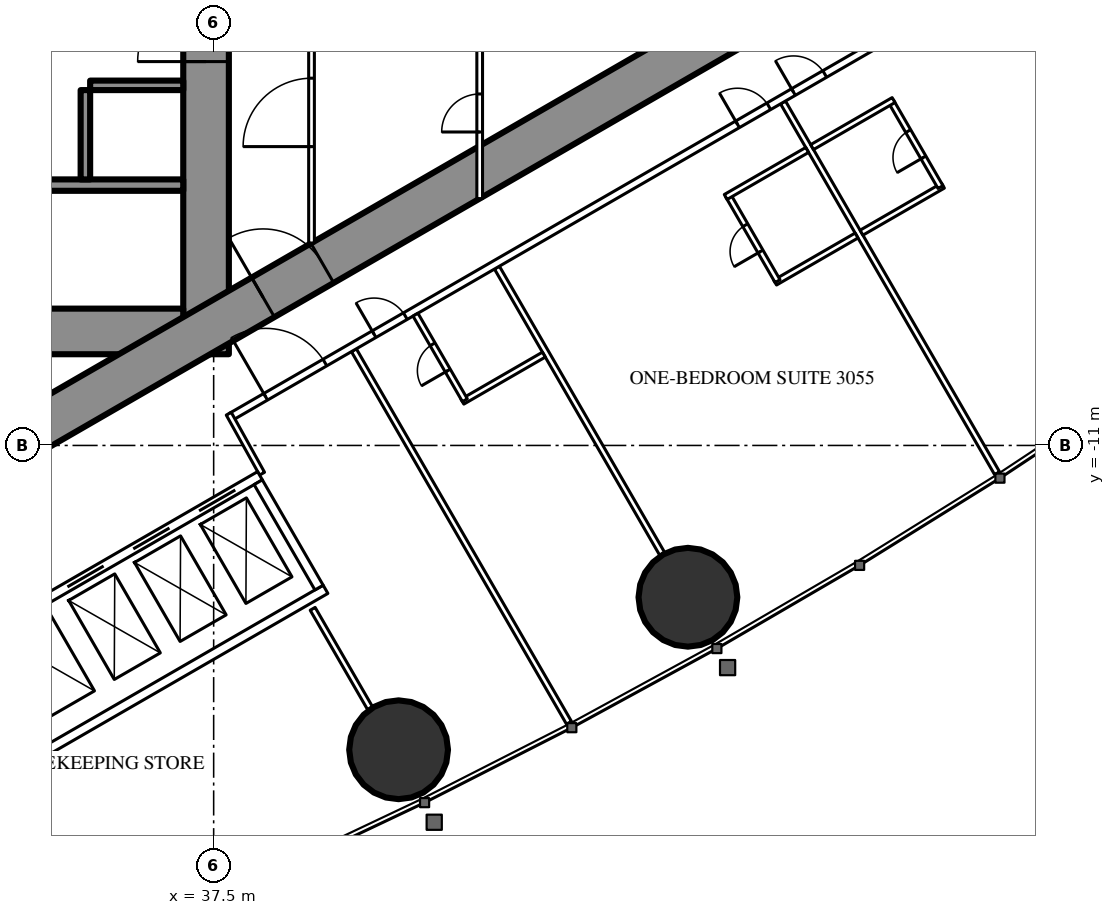
"""IFC4 building model, lengths in metres.
Left out: names, types, materials, properties, quantities, classifications, styles, units other than length and angle.
Written with IfcOpenShell. Run it as: python <this file> out.ifc"""

import sys

from ifc_helpers import new_model, si_unit, direction, frame, frame_2d, origin, origin_2d, place, context, subcontext, project, spatial, rectangle, hollow_circle, extrude, element, fill, save


model = new_model("IFC4")
c1 = context("Model", 3, precision=1e-05, world=origin(), true_north=direction((0.0, 1.0)))
c2 = subcontext(c1, "Body", "Model", "MODEL_VIEW")
j1 = project(units=[si_unit("LENGTHUNIT", "METRE"), si_unit("PLANEANGLEUNIT", "RADIAN")], contexts=[c1])
p1 = place(None, origin())
s1 = spatial("IfcSite", under=j1, at=p1, CompositionType="ELEMENT")
p2 = place(p1, origin())
s2 = spatial("IfcBuilding", under=s1, at=p2, CompositionType="ELEMENT")
p3 = place(p2, frame((0.0, 0.0, 115.1)))
s3 = spatial("IfcBuildingStorey", under=s2, at=p3, CompositionType="ELEMENT", Elevation=115.1)
for number, where, z_axis, x_axis in (
    (1, (42.366, -19.007, 0.0), (0.0, 0.0, 1.0), (1.0, 0.0, 0.0)),
    (2, (49.979, -14.994, 0.0), (0.0, 0.0, 1.0), (1.0, 0.0, 0.0)),
):
    element("IfcColumn", number, at=place(p3, frame(where, z_axis=z_axis, x_axis=x_axis)), inside=s3, PredefinedType="COLUMN", context=c2, shape_type="SweptSolid", body=[
        extrude(hollow_circle(Radius=1.3, WallThickness=0.1, at=origin_2d()), origin(), (0.0, 0.0, 1.0), 3.5),
    ])
p4 = place(p3, frame((37.3, -8.6, 0.0), z_axis=(0.0, 0.0, 1.0), x_axis=(0.0, 1.0, 0.0)))
e3 = element("IfcWall", 3, at=p4, inside=s3, PredefinedType="SHEAR", context=c2, shape_type="SweptSolid", body=[
    extrude(rectangle(XDim=17.2, YDim=1.2, at=frame_2d((8.6, 0.0))), origin(), (0.0, 0.0, 1.0), 3.5),
])
p5 = place(p4, frame((7.7, 0.0, 0.0)))
e4 = element("IfcOpeningElement", 4, at=p5, cuts=e3, PredefinedType="OPENING", context=c2, shape_type="SweptSolid", body=[
    extrude(rectangle(XDim=1.8, YDim=2.2, at=frame_2d((0.9, 1.1))), frame((0.0, 0.61, 0.0), z_axis=(0.0, -1.0, 0.0), x_axis=(1.0, 0.0, 0.0)), (0.0, 0.0, 1.0), 1.22),
])
p6 = place(p3, frame((28.3, -8.0, 0.0), z_axis=(0.0, 0.0, 1.0), x_axis=(1.0, 0.0, 0.0)))
e5 = element("IfcWall", 5, at=p6, inside=s3, PredefinedType="SHEAR", context=c2, shape_type="SweptSolid", body=[
    extrude(rectangle(XDim=8.4, YDim=1.2, at=frame_2d((4.2, 0.0))), origin(), (0.0, 0.0, 1.0), 3.5),
])
p7 = place(p6, frame((0.25, 0.0, 0.0)))
e6 = element("IfcOpeningElement", 6, at=p7, cuts=e5, PredefinedType="OPENING", context=c2, shape_type="SweptSolid", body=[
    extrude(rectangle(XDim=1.0, YDim=2.2, at=frame_2d((0.5, 1.1))), frame((0.0, 0.61, 0.0), z_axis=(0.0, -1.0, 0.0), x_axis=(1.0, 0.0, 0.0)), (0.0, 0.0, 1.0), 1.22),
])
p8 = place(p3, frame((28.3, -4.15, 0.0), z_axis=(0.0, 0.0, 1.0), x_axis=(1.0, 0.0, 0.0)))
e7 = element("IfcWall", 7, at=p8, inside=s3, PredefinedType="SHEAR", context=c2, shape_type="SweptSolid", body=[
    extrude(rectangle(XDim=8.4, YDim=0.3, at=frame_2d((4.2, 0.0))), origin(), (0.0, 0.0, 1.0), 3.5),
])
p9 = place(p3, frame((34.125, -4.0, 0.0), z_axis=(0.0, 0.0, 1.0), x_axis=(0.0, 1.0, 0.0)))
e8 = element("IfcWall", 8, at=p9, inside=s3, PredefinedType="SHEAR", context=c2, shape_type="SweptSolid", body=[
    extrude(rectangle(XDim=2.35, YDim=0.25, at=frame_2d((1.175, 0.0))), origin(), (0.0, 0.0, 1.0), 3.5),
])
p10 = place(p3, frame((34.25, -1.525, 0.0), z_axis=(0.0, 0.0, 1.0), x_axis=(1.0, 0.0, 0.0)))
e9 = element("IfcWall", 9, at=p10, inside=s3, PredefinedType="SHEAR", context=c2, shape_type="SweptSolid", body=[
    extrude(rectangle(XDim=2.45, YDim=0.25, at=frame_2d((1.225, 0.0))), origin(), (0.0, 0.0, 1.0), 3.5),
])
p11 = place(p3, frame((27.2, -13.8, 0.0), z_axis=(0.0, 0.0, 1.0), x_axis=(0.866027159892, 0.499996958321, 0.0)))
e10 = element("IfcWall", 10, at=p11, inside=s3, PredefinedType="SHEAR", context=c2, shape_type="SweptSolid", body=[
    extrude(rectangle(XDim=27.947, YDim=1.2, at=frame_2d((13.973, 0.0))), origin(), (0.0, 0.0, 1.0), 3.5),
])
p12 = place(p11, frame((4.6, 0.0, 0.0)))
e11 = element("IfcOpeningElement", 11, at=p12, cuts=e10, PredefinedType="OPENING", context=c2, shape_type="SweptSolid", body=[
    extrude(rectangle(XDim=1.0, YDim=2.2, at=frame_2d((0.5, 1.1))), frame((0.0, 0.61, 0.0), z_axis=(0.0, -1.0, 0.0), x_axis=(1.0, 0.0, 0.0)), (0.0, 0.0, 1.0), 1.22),
])
p13 = place(p11, frame((13.395, 0.0, 0.0)))
e12 = element("IfcOpeningElement", 12, at=p13, cuts=e10, PredefinedType="OPENING", context=c2, shape_type="SweptSolid", body=[
    extrude(rectangle(XDim=1.8, YDim=2.2, at=frame_2d((0.9, 1.1))), frame((0.0, 0.61, 0.0), z_axis=(0.0, -1.0, 0.0), x_axis=(1.0, 0.0, 0.0)), (0.0, 0.0, 1.0), 1.22),
])
p14 = place(p3, frame((41.19, -8.494, 0.0), z_axis=(0.0, 0.0, 1.0), x_axis=(0.49999258054, -0.866029687369, 0.0)))
e13 = element("IfcWall", 13, at=p14, inside=s3, PredefinedType="PARTITIONING", context=c2, shape_type="SweptSolid", body=[
    extrude(rectangle(XDim=11.318, YDim=0.15, at=frame_2d((5.659, 0.0))), origin(), (0.0, 0.0, 1.0), 3.25),
])
p15 = place(p3, frame((44.954, -6.321, 0.0), z_axis=(0.0, 0.0, 1.0), x_axis=(0.500018676722, -0.866014620505, 0.0)))
e14 = element("IfcWall", 14, at=p15, inside=s3, PredefinedType="PARTITIONING", context=c2, shape_type="SweptSolid", body=[
    extrude(rectangle(XDim=8.704, YDim=0.15, at=frame_2d((4.352, 0.0))), origin(), (0.0, 0.0, 1.0), 2.2),
])
p16 = place(p3, frame((52.481, -1.975, 0.0), z_axis=(0.0, 0.0, 1.0), x_axis=(0.500003867771, -0.866023170714, 0.0)))
e15 = element("IfcWall", 15, at=p16, inside=s3, PredefinedType="PARTITIONING", context=c2, shape_type="SweptSolid", body=[
    extrude(rectangle(XDim=11.265, YDim=0.15, at=frame_2d((5.632, 0.0))), origin(), (0.0, 0.0, 1.0), 3.25),
])
p17 = place(p3, frame((40.105, -15.299, 0.0), z_axis=(0.0, 0.0, 1.0), x_axis=(0.499978822259, -0.866037630414, 0.0)))
e16 = element("IfcWall", 16, at=p17, inside=s3, PredefinedType="PARTITIONING", context=c2, shape_type="SweptSolid", body=[
    extrude(rectangle(XDim=3.023, YDim=0.15, at=frame_2d((1.511, 0.0))), origin(), (0.0, 0.0, 1.0), 3.25),
])
p18 = place(p3, frame((37.96, -10.243, 0.0), z_axis=(0.0, 0.0, 1.0), x_axis=(0.866026429433, 0.499998223521, 0.0)))
e17 = element("IfcWall", 17, at=p18, inside=s3, PredefinedType="PARTITIONING", context=c2, shape_type="SweptSolid", body=[
    extrude(rectangle(XDim=20.487, YDim=0.2, at=frame_2d((10.243, 0.0))), origin(), (0.0, 0.0, 1.0), 3.25),
])
p19 = place(p18, frame((4.343, 0.0, 0.0)))
e18 = element("IfcOpeningElement", 18, at=p19, cuts=e17, PredefinedType="OPENING", context=c2, shape_type="SweptSolid", body=[
    extrude(rectangle(XDim=0.95, YDim=2.2, at=frame_2d((0.475, 1.1))), frame((0.0, 0.11, 0.0), z_axis=(0.0, -1.0, 0.0), x_axis=(1.0, 0.0, 0.0)), (0.0, 0.0, 1.0), 0.22),
])
p20 = place(p18, frame((15.385, 0.0, 0.0)))
e19 = element("IfcOpeningElement", 19, at=p20, cuts=e17, PredefinedType="OPENING", context=c2, shape_type="SweptSolid", body=[
    extrude(rectangle(XDim=0.95, YDim=2.2, at=frame_2d((0.475, 1.1))), frame((0.0, 0.11, 0.0), z_axis=(0.0, -1.0, 0.0), x_axis=(1.0, 0.0, 0.0)), (0.0, 0.0, 1.0), 0.22),
])
p21 = place(p18, frame((17.085, 0.0, 0.0)))
e20 = element("IfcOpeningElement", 20, at=p21, cuts=e17, PredefinedType="OPENING", context=c2, shape_type="SweptSolid", body=[
    extrude(rectangle(XDim=0.95, YDim=2.2, at=frame_2d((0.475, 1.1))), frame((0.0, 0.11, 0.0), z_axis=(0.0, -1.0, 0.0), x_axis=(1.0, 0.0, 0.0)), (0.0, 0.0, 1.0), 0.22),
])
p22 = place(p18, frame((1.048, 0.0, 0.0)))
e21 = element("IfcOpeningElement", 21, at=p22, cuts=e17, PredefinedType="OPENING", context=c2, shape_type="SweptSolid", body=[
    extrude(rectangle(XDim=1.8, YDim=2.2, at=frame_2d((0.9, 1.1))), frame((0.0, 0.11, 0.0), z_axis=(0.0, -1.0, 0.0), x_axis=(1.0, 0.0, 0.0)), (0.0, 0.0, 1.0), 0.22),
])
p23 = place(p3, frame((38.773, -11.742, 0.0), z_axis=(0.0, 0.0, 1.0), x_axis=(-0.485528096672, 0.8742210632, 0.0)))
e22 = element("IfcWall", 22, at=p23, inside=s3, PredefinedType="PARTITIONING", context=c2, shape_type="SweptSolid", body=[
    extrude(rectangle(XDim=1.805, YDim=0.15, at=frame_2d((0.903, 0.0))), origin(), (0.0, 0.0, 1.0), 3.25),
])
p24 = place(p3, frame((44.045, -9.848, 0.0), z_axis=(0.0, 0.0, 1.0), x_axis=(0.866031185235, 0.4999899861, 0.0)))
e23 = element("IfcWall", 23, at=p24, inside=s3, PredefinedType="PARTITIONING", context=c2, shape_type="SweptSolid", body=[
    extrude(rectangle(XDim=2.475, YDim=0.15, at=frame_2d((1.238, 0.0))), origin(), (0.0, 0.0, 1.0), 3.25),
])
p25 = place(p3, frame((42.81, -7.559, 0.0), z_axis=(0.0, 0.0, 1.0), x_axis=(0.499936506574, -0.866062058628, 0.0)))
e24 = element("IfcWall", 24, at=p25, inside=s3, PredefinedType="PARTITIONING", context=c2, shape_type="SweptSolid", body=[
    extrude(rectangle(XDim=2.6, YDim=0.15, at=frame_2d((1.3, 0.0))), origin(), (0.0, 0.0, 1.0), 3.25),
])
p26 = place(p25, frame((0.9, 0.0, 0.0)))
e25 = element("IfcOpeningElement", 25, at=p26, cuts=e24, PredefinedType="OPENING", context=c2, shape_type="SweptSolid", body=[
    extrude(rectangle(XDim=0.8, YDim=2.2, at=frame_2d((0.4, 1.1))), frame((0.0, 0.085, 0.0), z_axis=(0.0, -1.0, 0.0), x_axis=(1.0, 0.0, 0.0)), (0.0, 0.0, 1.0), 0.17),
])
p27 = place(p3, frame((52.273, -6.714, 0.0), z_axis=(0.0, 0.0, 1.0), x_axis=(0.866031185235, 0.4999899861, 0.0)))
e26 = element("IfcWall", 26, at=p27, inside=s3, PredefinedType="PARTITIONING", context=c2, shape_type="SweptSolid", body=[
    extrude(rectangle(XDim=2.475, YDim=0.15, at=frame_2d((1.238, 0.0))), origin(), (0.0, 0.0, 1.0), 3.25),
])
p28 = place(p3, frame((51.038, -4.425, 0.0), z_axis=(0.0, 0.0, 1.0), x_axis=(0.49997716683, -0.86603858612, 0.0)))
e27 = element("IfcWall", 27, at=p28, inside=s3, PredefinedType="PARTITIONING", context=c2, shape_type="SweptSolid", body=[
    extrude(rectangle(XDim=2.6, YDim=0.15, at=frame_2d((1.3, 0.0))), origin(), (0.0, 0.0, 1.0), 3.25),
])
p29 = place(p28, frame((0.9, 0.0, 0.0)))
e28 = element("IfcOpeningElement", 28, at=p29, cuts=e27, PredefinedType="OPENING", context=c2, shape_type="SweptSolid", body=[
    extrude(rectangle(XDim=0.8, YDim=2.2, at=frame_2d((0.4, 1.1))), frame((0.0, 0.085, 0.0), z_axis=(0.0, -1.0, 0.0), x_axis=(1.0, 0.0, 0.0)), (0.0, 0.0, 1.0), 0.17),
])
p30 = place(p3, frame((50.973, -4.462, 0.0), z_axis=(0.0, 0.0, 1.0), x_axis=(0.866031185235, 0.4999899861, 0.0)))
e29 = element("IfcWall", 29, at=p30, inside=s3, PredefinedType="PARTITIONING", context=c2, shape_type="SweptSolid", body=[
    extrude(rectangle(XDim=2.475, YDim=0.15, at=frame_2d((1.238, 0.0))), origin(), (0.0, 0.0, 1.0), 3.25),
])
p31 = place(p3, frame((54.546, -5.402, 0.0), z_axis=(0.0, 0.0, 1.0), x_axis=(0.866006523861, 0.500032699561, 0.0)))
e30 = element("IfcWall", 30, at=p31, inside=s3, PredefinedType="PARTITIONING", context=c2, shape_type="SweptSolid", body=[
    extrude(rectangle(XDim=2.475, YDim=0.15, at=frame_2d((1.237, 0.0))), origin(), (0.0, 0.0, 1.0), 3.25),
])
p32 = place(p3, frame((55.325, -1.95, 0.0), z_axis=(0.0, 0.0, 1.0), x_axis=(0.500006934395, -0.866021400173, 0.0)))
e31 = element("IfcWall", 31, at=p32, inside=s3, PredefinedType="PARTITIONING", context=c2, shape_type="SweptSolid", body=[
    extrude(rectangle(XDim=2.6, YDim=0.15, at=frame_2d((1.3, 0.0))), origin(), (0.0, 0.0, 1.0), 3.25),
])
p33 = place(p32, frame((0.9, 0.0, 0.0)))
e32 = element("IfcOpeningElement", 32, at=p33, cuts=e31, PredefinedType="OPENING", context=c2, shape_type="SweptSolid", body=[
    extrude(rectangle(XDim=0.8, YDim=2.2, at=frame_2d((0.4, 1.1))), frame((0.0, 0.085, 0.0), z_axis=(0.0, -1.0, 0.0), x_axis=(1.0, 0.0, 0.0)), (0.0, 0.0, 1.0), 0.17),
])
p34 = place(p3, frame((53.246, -3.15, 0.0), z_axis=(0.0, 0.0, 1.0), x_axis=(0.866006523861, 0.500032699561, 0.0)))
e33 = element("IfcWall", 33, at=p34, inside=s3, PredefinedType="PARTITIONING", context=c2, shape_type="SweptSolid", body=[
    extrude(rectangle(XDim=2.475, YDim=0.15, at=frame_2d((1.237, 0.0))), origin(), (0.0, 0.0, 1.0), 3.25),
])
p35 = place(p3, frame((40.075, -5.674, 0.0), z_axis=(0.0, 0.0, 1.0), x_axis=(0.0, 1.0, 0.0)))
e34 = element("IfcWall", 34, at=p35, inside=s3, PredefinedType="PARTITIONING", context=c2, shape_type="SweptSolid", body=[
    extrude(rectangle(XDim=6.874, YDim=0.15, at=frame_2d((3.437, 0.0))), origin(), (0.0, 0.0, 1.0), 3.25),
])
p36 = place(p35, frame((2.537, 0.0, 0.0)))
e35 = element("IfcOpeningElement", 35, at=p36, cuts=e34, PredefinedType="OPENING", context=c2, shape_type="SweptSolid", body=[
    extrude(rectangle(XDim=1.8, YDim=2.2, at=frame_2d((0.9, 1.1))), frame((0.0, 0.085, 0.0), z_axis=(0.0, -1.0, 0.0), x_axis=(1.0, 0.0, 0.0)), (0.0, 0.0, 1.0), 0.17),
])
p37 = place(p3, frame((44.5, -4.505, 0.0), z_axis=(0.0, 0.0, 1.0), x_axis=(0.0, 1.0, 0.0)))
e36 = element("IfcWall", 36, at=p37, inside=s3, PredefinedType="PARTITIONING", context=c2, shape_type="SweptSolid", body=[
    extrude(rectangle(XDim=9.009, YDim=0.15, at=frame_2d((4.505, 0.0))), origin(), (0.0, 0.0, 1.0), 2.45),
])
p38 = place(p37, frame((1.752, 0.0, 0.0)))
e37 = element("IfcOpeningElement", 37, at=p38, cuts=e36, PredefinedType="OPENING", context=c2, shape_type="SweptSolid", body=[
    extrude(rectangle(XDim=1.0, YDim=2.2, at=frame_2d((0.5, 1.1))), frame((0.0, 0.085, 0.0), z_axis=(0.0, -1.0, 0.0), x_axis=(1.0, 0.0, 0.0)), (0.0, 0.0, 1.0), 0.17),
])
p39 = place(p37, frame((6.257, 0.0, 0.0)))
e38 = element("IfcOpeningElement", 38, at=p39, cuts=e36, PredefinedType="OPENING", context=c2, shape_type="SweptSolid", body=[
    extrude(rectangle(XDim=1.0, YDim=2.2, at=frame_2d((0.5, 1.1))), frame((0.0, 0.085, 0.0), z_axis=(0.0, -1.0, 0.0), x_axis=(1.0, 0.0, 0.0)), (0.0, 0.0, 1.0), 0.17),
])
p40 = place(p3, frame((31.271, -16.097, 0.0), z_axis=(0.0, 0.0, 1.0), x_axis=(0.86604045752, 0.499973925258, 0.0)))
e39 = element("IfcWall", 39, at=p40, inside=s3, PredefinedType="PARTITIONING", context=c2, shape_type="SweptSolid", body=[
    extrude(rectangle(XDim=8.6, YDim=0.25, at=frame_2d((4.3, 0.0))), origin(), (0.0, 0.0, 1.0), 3.25),
])
p41 = place(p40, frame((0.75, 0.0, 0.0)))
e40 = element("IfcOpeningElement", 40, at=p41, cuts=e39, PredefinedType="OPENING", context=c2, shape_type="SweptSolid", body=[
    extrude(rectangle(XDim=1.1, YDim=2.2, at=frame_2d((0.55, 1.1))), frame((0.0, 0.135, 0.0), z_axis=(0.0, -1.0, 0.0), x_axis=(1.0, 0.0, 0.0)), (0.0, 0.0, 1.0), 0.27),
])
p42 = place(p40, frame((2.75, 0.0, 0.0)))
e41 = element("IfcOpeningElement", 41, at=p42, cuts=e39, PredefinedType="OPENING", context=c2, shape_type="SweptSolid", body=[
    extrude(rectangle(XDim=1.1, YDim=2.2, at=frame_2d((0.55, 1.1))), frame((0.0, 0.135, 0.0), z_axis=(0.0, -1.0, 0.0), x_axis=(1.0, 0.0, 0.0)), (0.0, 0.0, 1.0), 0.27),
])
p43 = place(p40, frame((4.75, 0.0, 0.0)))
e42 = element("IfcOpeningElement", 42, at=p43, cuts=e39, PredefinedType="OPENING", context=c2, shape_type="SweptSolid", body=[
    extrude(rectangle(XDim=1.1, YDim=2.2, at=frame_2d((0.55, 1.1))), frame((0.0, 0.135, 0.0), z_axis=(0.0, -1.0, 0.0), x_axis=(1.0, 0.0, 0.0)), (0.0, 0.0, 1.0), 0.27),
])
p44 = place(p40, frame((6.75, 0.0, 0.0)))
e43 = element("IfcOpeningElement", 43, at=p44, cuts=e39, PredefinedType="OPENING", context=c2, shape_type="SweptSolid", body=[
    extrude(rectangle(XDim=1.1, YDim=2.2, at=frame_2d((0.55, 1.1))), frame((0.0, 0.135, 0.0), z_axis=(0.0, -1.0, 0.0), x_axis=(1.0, 0.0, 0.0)), (0.0, 0.0, 1.0), 0.27),
])
p45 = place(p3, frame((32.996, -19.086, 0.0), z_axis=(0.0, 0.0, 1.0), x_axis=(0.866028165386, 0.499995216735, 0.0)))
e44 = element("IfcWall", 44, at=p45, inside=s3, PredefinedType="PARTITIONING", context=c2, shape_type="SweptSolid", body=[
    extrude(rectangle(XDim=8.6, YDim=0.25, at=frame_2d((4.3, 0.0))), origin(), (0.0, 0.0, 1.0), 3.25),
])
p46 = place(p3, frame((38.673, -11.968, 0.0), z_axis=(0.0, 0.0, 1.0), x_axis=(0.499929347863, -0.866066190972, 0.0)))
e45 = element("IfcWall", 45, at=p46, inside=s3, PredefinedType="PARTITIONING", context=c2, shape_type="SweptSolid", body=[
    extrude(rectangle(XDim=3.201, YDim=0.25, at=frame_2d((1.6, 0.0))), origin(), (0.0, 0.0, 1.0), 3.25),
])
p47 = place(p26, origin())
e46 = element("IfcDoor", 46, at=p47, inside=s3, OperationType="SINGLE_SWING_RIGHT", PredefinedType="DOOR", context=c2, shape_type="SweptSolid", body=[
    extrude(rectangle(XDim=0.8, YDim=2.2, at=frame_2d((0.4, 1.1))), frame((0.0, 0.025, 0.0), z_axis=(0.0, -1.0, 0.0), x_axis=(1.0, 0.0, 0.0)), (0.0, 0.0, 1.0), 0.05),
])
fill(e25, e46)
p48 = place(p19, origin())
e47 = element("IfcDoor", 47, at=p48, inside=s3, OperationType="SINGLE_SWING_LEFT", PredefinedType="DOOR", context=c2, shape_type="SweptSolid", body=[
    extrude(rectangle(XDim=0.95, YDim=2.2, at=frame_2d((0.475, 1.1))), frame((0.0, 0.025, 0.0), z_axis=(0.0, -1.0, 0.0), x_axis=(1.0, 0.0, 0.0)), (0.0, 0.0, 1.0), 0.05),
])
fill(e18, e47)
p49 = place(p29, origin())
e48 = element("IfcDoor", 48, at=p49, inside=s3, OperationType="SINGLE_SWING_RIGHT", PredefinedType="DOOR", context=c2, shape_type="SweptSolid", body=[
    extrude(rectangle(XDim=0.8, YDim=2.2, at=frame_2d((0.4, 1.1))), frame((0.0, 0.025, 0.0), z_axis=(0.0, -1.0, 0.0), x_axis=(1.0, 0.0, 0.0)), (0.0, 0.0, 1.0), 0.05),
])
fill(e28, e48)
p50 = place(p20, origin())
e49 = element("IfcDoor", 49, at=p50, inside=s3, OperationType="SINGLE_SWING_LEFT", PredefinedType="DOOR", context=c2, shape_type="SweptSolid", body=[
    extrude(rectangle(XDim=0.95, YDim=2.2, at=frame_2d((0.475, 1.1))), frame((0.0, 0.025, 0.0), z_axis=(0.0, -1.0, 0.0), x_axis=(1.0, 0.0, 0.0)), (0.0, 0.0, 1.0), 0.05),
])
fill(e19, e49)
p51 = place(p33, origin())
e50 = element("IfcDoor", 50, at=p51, inside=s3, OperationType="SINGLE_SWING_RIGHT", PredefinedType="DOOR", context=c2, shape_type="SweptSolid", body=[
    extrude(rectangle(XDim=0.8, YDim=2.2, at=frame_2d((0.4, 1.1))), frame((0.0, 0.025, 0.0), z_axis=(0.0, -1.0, 0.0), x_axis=(1.0, 0.0, 0.0)), (0.0, 0.0, 1.0), 0.05),
])
fill(e32, e50)
p52 = place(p21, origin())
e51 = element("IfcDoor", 51, at=p52, inside=s3, OperationType="SINGLE_SWING_LEFT", PredefinedType="DOOR", context=c2, shape_type="SweptSolid", body=[
    extrude(rectangle(XDim=0.95, YDim=2.2, at=frame_2d((0.475, 1.1))), frame((0.0, 0.025, 0.0), z_axis=(0.0, -1.0, 0.0), x_axis=(1.0, 0.0, 0.0)), (0.0, 0.0, 1.0), 0.05),
])
fill(e20, e51)
p53 = place(p22, origin())
e52 = element("IfcDoor", 52, at=p53, inside=s3, OperationType="DOUBLE_DOOR_SINGLE_SWING", PredefinedType="DOOR", context=c2, shape_type="SweptSolid", body=[
    extrude(rectangle(XDim=1.8, YDim=2.2, at=frame_2d((0.9, 1.1))), frame((0.0, 0.025, 0.0), z_axis=(0.0, -1.0, 0.0), x_axis=(1.0, 0.0, 0.0)), (0.0, 0.0, 1.0), 0.05),
])
fill(e21, e52)
p54 = place(p36, origin())
e53 = element("IfcDoor", 53, at=p54, inside=s3, OperationType="DOUBLE_DOOR_SINGLE_SWING", PredefinedType="DOOR", context=c2, shape_type="SweptSolid", body=[
    extrude(rectangle(XDim=1.8, YDim=2.2, at=frame_2d((0.9, 1.1))), frame((0.0, 0.025, 0.0), z_axis=(0.0, -1.0, 0.0), x_axis=(1.0, 0.0, 0.0)), (0.0, 0.0, 1.0), 0.05),
])
fill(e35, e53)
p55 = place(p38, origin())
e54 = element("IfcDoor", 54, at=p55, inside=s3, OperationType="SINGLE_SWING_LEFT", PredefinedType="DOOR", context=c2, shape_type="SweptSolid", body=[
    extrude(rectangle(XDim=1.0, YDim=2.2, at=frame_2d((0.5, 1.1))), frame((0.0, 0.025, 0.0), z_axis=(0.0, -1.0, 0.0), x_axis=(1.0, 0.0, 0.0)), (0.0, 0.0, 1.0), 0.05),
])
fill(e37, e54)
p56 = place(p13, origin())
e55 = element("IfcDoor", 55, at=p56, inside=s3, OperationType="DOUBLE_DOOR_SINGLE_SWING", PredefinedType="DOOR", context=c2, shape_type="SweptSolid", body=[
    extrude(rectangle(XDim=1.8, YDim=2.2, at=frame_2d((0.9, 1.1))), frame((0.0, 0.025, 0.0), z_axis=(0.0, -1.0, 0.0), x_axis=(1.0, 0.0, 0.0)), (0.0, 0.0, 1.0), 0.05),
])
fill(e12, e55)
p57 = place(p5, origin())
e56 = element("IfcDoor", 56, at=p57, inside=s3, OperationType="DOUBLE_DOOR_SINGLE_SWING", PredefinedType="DOOR", context=c2, shape_type="SweptSolid", body=[
    extrude(rectangle(XDim=1.8, YDim=2.2, at=frame_2d((0.9, 1.1))), frame((0.0, 0.025, 0.0), z_axis=(0.0, -1.0, 0.0), x_axis=(1.0, 0.0, 0.0)), (0.0, 0.0, 1.0), 0.05),
])
fill(e4, e56)
p58 = place(p42, origin())
e57 = element("IfcDoor", 57, at=p58, inside=s3, OperationType="DOUBLE_DOOR_SLIDING", PredefinedType="USERDEFINED", context=c2, shape_type="SweptSolid", body=[
    extrude(rectangle(XDim=1.1, YDim=2.2, at=frame_2d((0.55, 1.1))), frame((0.0, 0.025, 0.0), z_axis=(0.0, -1.0, 0.0), x_axis=(1.0, 0.0, 0.0)), (0.0, 0.0, 1.0), 0.05),
])
fill(e41, e57)
p59 = place(p43, origin())
e58 = element("IfcDoor", 58, at=p59, inside=s3, OperationType="DOUBLE_DOOR_SLIDING", PredefinedType="USERDEFINED", context=c2, shape_type="SweptSolid", body=[
    extrude(rectangle(XDim=1.1, YDim=2.2, at=frame_2d((0.55, 1.1))), frame((0.0, 0.025, 0.0), z_axis=(0.0, -1.0, 0.0), x_axis=(1.0, 0.0, 0.0)), (0.0, 0.0, 1.0), 0.05),
])
fill(e42, e58)
p60 = place(p44, origin())
e59 = element("IfcDoor", 59, at=p60, inside=s3, OperationType="DOUBLE_DOOR_SLIDING", PredefinedType="USERDEFINED", context=c2, shape_type="SweptSolid", body=[
    extrude(rectangle(XDim=1.1, YDim=2.2, at=frame_2d((0.55, 1.1))), frame((0.0, 0.025, 0.0), z_axis=(0.0, -1.0, 0.0), x_axis=(1.0, 0.0, 0.0)), (0.0, 0.0, 1.0), 0.05),
])
fill(e43, e59)
save(model, sys.argv[1])
